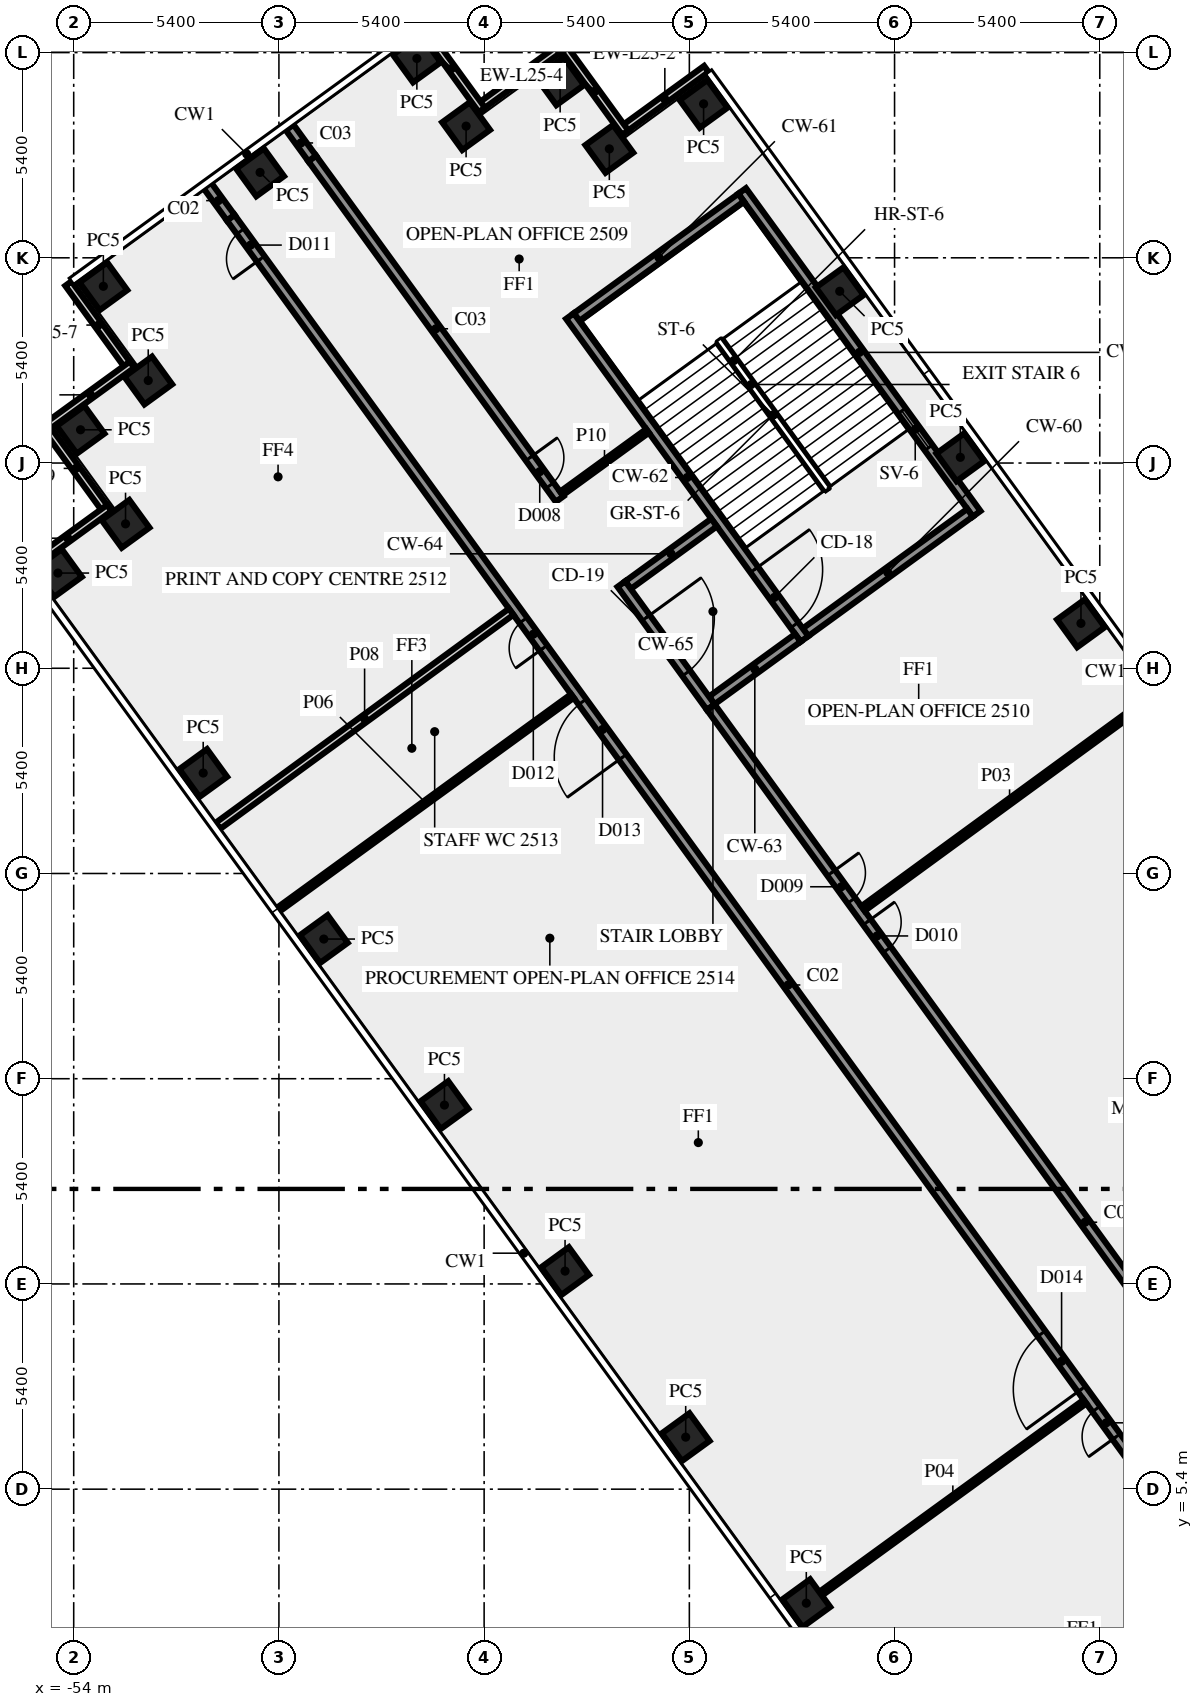
"""IFC4 building model, lengths in metres.
Left out: names, types, materials, properties, quantities, classifications, styles, units other than length and angle.
Written with IfcOpenShell. Run it as: python <this file> out.ifc"""

import sys

from ifc_helpers import new_model, si_unit, direction, frame, frame_2d, origin, origin_2d, place, context, subcontext, project, spatial, rectangle, extrude, element, fill, save


model = new_model("IFC4")
c1 = context("Model", 3, precision=1e-05, world=origin(), true_north=direction((0.0, 1.0)))
c2 = subcontext(c1, "Body", "Model", "MODEL_VIEW")
j1 = project(units=[si_unit("LENGTHUNIT", "METRE"), si_unit("PLANEANGLEUNIT", "RADIAN")], contexts=[c1])
p1 = place(None, origin())
s1 = spatial("IfcSite", under=j1, at=p1, CompositionType="ELEMENT")
p2 = place(p1, origin())
s2 = spatial("IfcBuilding", under=s1, at=p2, CompositionType="ELEMENT")
p3 = place(p2, frame((0.0, 0.0, 109.0)))
s3 = spatial("IfcBuildingStorey", under=s2, at=p3, CompositionType="ELEMENT", Elevation=109.0)
for number, where, z_axis, x_axis in (
    (1, (-27.495, 28.181, 0.0), (0.0, 0.0, 1.0), (-0.588, 0.809, 0.0)),
    (2, (-30.669, 32.55, 0.0), (0.0, 0.0, 1.0), (-0.588, 0.809, 0.0)),
    (3, (-33.843, 36.919, 0.0), (0.0, 0.0, 1.0), (-0.588, 0.809, 0.0)),
    (4, (-37.425, 41.85, 0.0), (0.0, 0.0, 1.0), (-0.588, 0.809, 0.0)),
    (5, (-39.906, 40.666, 0.0), (0.0, 0.0, 1.0), (-0.588, 0.809, 0.0)),
    (6, (-41.2, 42.445, 0.0), (0.0, 0.0, 1.0), (-0.588, 0.809, 0.0)),
    (7, (-43.675, 41.265, 0.0), (0.0, 0.0, 1.0), (-0.809, -0.588, 0.0)),
    (8, (-44.97, 43.045, 0.0), (0.0, 0.0, 1.0), (-0.809, -0.588, 0.0)),
    (9, (-49.096, 40.047, 0.0), (0.0, 0.0, 1.0), (-0.809, -0.588, 0.0)),
    (10, (-53.22, 37.05, 0.0), (0.0, 0.0, 1.0), (0.588, -0.809, 0.0)),
    (11, (-52.039, 34.571, 0.0), (0.0, 0.0, 1.0), (-0.809, -0.588, 0.0)),
    (12, (-53.82, 33.275, 0.0), (0.0, 0.0, 1.0), (0.588, -0.809, 0.0)),
    (13, (-52.636, 30.8, 0.0), (0.0, 0.0, 1.0), (-0.809, -0.588, 0.0)),
    (14, (-54.415, 29.505, 0.0), (0.0, 0.0, 1.0), (0.588, -0.809, 0.0)),
    (15, (-50.592, 24.243, 0.0), (0.0, 0.0, 1.0), (0.588, -0.809, 0.0)),
    (16, (-47.418, 19.875, 0.0), (0.0, 0.0, 1.0), (0.588, -0.809, 0.0)),
    (17, (-44.244, 15.506, 0.0), (0.0, 0.0, 1.0), (0.588, -0.809, 0.0)),
    (18, (-41.07, 11.137, 0.0), (0.0, 0.0, 1.0), (0.588, -0.809, 0.0)),
    (19, (-37.896, 6.769, 0.0), (0.0, 0.0, 1.0), (0.588, -0.809, 0.0)),
    (20, (-34.722, 2.4, 0.0), (0.0, 0.0, 1.0), (0.588, -0.809, 0.0)),
):
    element("IfcColumn", number, at=place(p3, frame(where, z_axis=z_axis, x_axis=x_axis)), inside=s3, PredefinedType="COLUMN", context=c2, shape_type="SweptSolid", body=[
        extrude(rectangle(XDim=0.9, YDim=0.9, at=origin_2d()), origin(), (0.0, 0.0, 1.0), 3.65),
    ])
p4 = place(p3, frame((-37.353, 42.768, 0.0), z_axis=(0.0, 0.0, 1.0), x_axis=(-0.809033161865, -0.587762999008, 0.0)))
e21 = element("IfcWall", 21, at=p4, inside=s3, PredefinedType="SOLIDWALL", context=c2, shape_type="SweptSolid", body=[
    extrude(rectangle(XDim=2.7, YDim=0.2, at=frame_2d((1.35, 0.0))), origin(), (0.0, 0.0, 1.0), 3.65),
])
p5 = place(p3, frame((-39.488, 41.094, 0.0), z_axis=(0.0, 0.0, 1.0), x_axis=(-0.587806000234, 0.809001919707, 0.0)))
e22 = element("IfcWall", 22, at=p5, inside=s3, PredefinedType="SOLIDWALL", context=c2, shape_type="SweptSolid", body=[
    extrude(rectangle(XDim=2.7, YDim=0.2, at=frame_2d((1.35, 0.0))), origin(), (0.0, 0.0, 1.0), 3.65),
])
for number, where, z_axis, x_axis in (
    (23, (-41.124, 43.366, 0.0), (0.0, 0.0, 1.0), (-0.809, -0.588, 0.0)),
    (24, (-43.259, 41.691, 0.0), (0.0, 0.0, 1.0), (-0.588, 0.809, 0.0)),
    (25, (-54.14, 37.123, 0.0), (0.0, 0.0, 1.0), (0.588, -0.809, 0.0)),
    (26, (-52.465, 34.987, 0.0), (0.0, 0.0, 1.0), (-0.809, -0.588, 0.0)),
):
    element("IfcWall", number, at=place(p3, frame(where, z_axis=z_axis, x_axis=x_axis)), inside=s3, PredefinedType="SOLIDWALL", context=c2, shape_type="SweptSolid", body=[
        extrude(rectangle(XDim=2.7, YDim=0.2, at=frame_2d((1.35, 0.0))), origin(), (0.0, 0.0, 1.0), 3.65),
    ])
p6 = place(p3, frame((-54.738, 33.351, 0.0), z_axis=(0.0, 0.0, 1.0), x_axis=(0.587779184282, -0.809021403008, 0.0)))
e27 = element("IfcWall", 27, at=p6, inside=s3, PredefinedType="SOLIDWALL", context=c2, shape_type="SweptSolid", body=[
    extrude(rectangle(XDim=2.7, YDim=0.2, at=frame_2d((1.35, 0.0))), origin(), (0.0, 0.0, 1.0), 3.65),
])
p7 = place(p3, frame((-53.063, 31.216, 0.0), z_axis=(0.0, 0.0, 1.0), x_axis=(-0.809033161865, -0.587762999008, 0.0)))
e28 = element("IfcWall", 28, at=p7, inside=s3, PredefinedType="SOLIDWALL", context=c2, shape_type="SweptSolid", body=[
    extrude(rectangle(XDim=2.7, YDim=0.2, at=frame_2d((1.35, 0.0))), origin(), (0.0, 0.0, 1.0), 3.65),
])
p8 = place(p3, frame((-30.24, 31.064, 0.0), z_axis=(0.0, 0.0, 1.0), x_axis=(-0.587795589702, 0.809009483706, 0.0)))
e29 = element("IfcWall", 29, at=p8, inside=s3, PredefinedType="SHEAR", context=c2, shape_type="SweptSolid", body=[
    extrude(rectangle(XDim=10.5, YDim=0.25, at=frame_2d((5.25, 0.0))), origin(), (0.0, 0.0, 1.0), 3.65),
])
p9 = place(p8, frame((2.15, 0.0, 1.0)))
e30 = element("IfcOpeningElement", 30, at=p9, cuts=e29, PredefinedType="OPENING", context=c2, shape_type="SweptSolid", body=[
    extrude(rectangle(XDim=1.2, YDim=1.2, at=frame_2d((0.6, 0.6))), frame((0.0, 0.135, 0.0), z_axis=(0.0, -1.0, 0.0), x_axis=(1.0, 0.0, 0.0)), (0.0, 0.0, 1.0), 0.27),
])
p10 = place(p3, frame((-30.414, 31.092, 0.0), z_axis=(0.0, 0.0, 1.0), x_axis=(-0.8089984606, -0.587810760999, 0.0)))
e31 = element("IfcWall", 31, at=p10, inside=s3, PredefinedType="SHEAR", context=c2, shape_type="SweptSolid", body=[
    extrude(rectangle(XDim=5.35, YDim=0.25, at=frame_2d((2.675, 0.0))), origin(), (0.0, 0.0, 1.0), 3.65),
])
p11 = place(p3, frame((-36.439, 39.384, 0.0), z_axis=(0.0, 0.0, 1.0), x_axis=(-0.809020161303, -0.587780893365, 0.0)))
e32 = element("IfcWall", 32, at=p11, inside=s3, PredefinedType="SHEAR", context=c2, shape_type="SweptSolid", body=[
    extrude(rectangle(XDim=5.35, YDim=0.25, at=frame_2d((2.675, 0.0))), origin(), (0.0, 0.0, 1.0), 3.65),
])
p12 = place(p3, frame((-40.942, 36.267, 0.0), z_axis=(0.0, 0.0, 1.0), x_axis=(0.587795589702, -0.809009483706, 0.0)))
e33 = element("IfcWall", 33, at=p12, inside=s3, PredefinedType="SHEAR", context=c2, shape_type="SweptSolid", body=[
    extrude(rectangle(XDim=10.5, YDim=0.25, at=frame_2d((5.25, 0.0))), origin(), (0.0, 0.0, 1.0), 3.65),
])
p13 = place(p12, frame((8.25, 0.0, 0.0)))
e34 = element("IfcOpeningElement", 34, at=p13, cuts=e33, PredefinedType="OPENING", context=c2, shape_type="SweptSolid", body=[
    extrude(rectangle(XDim=1.8, YDim=2.1, at=frame_2d((0.9, 1.05))), frame((0.0, 0.135, 0.0), z_axis=(0.0, -1.0, 0.0), x_axis=(1.0, 0.0, 0.0)), (0.0, 0.0, 1.0), 0.27),
])
for number, where, z_axis, x_axis in (
    (35, (-34.945, 27.8, 0.0), (0.0, 0.0, 1.0), (-0.809, -0.588, 0.0)),
    (36, (-37.149, 30.834, 0.0), (0.0, 0.0, 1.0), (-0.809, -0.588, 0.0)),
):
    element("IfcWall", number, at=place(p3, frame(where, z_axis=z_axis, x_axis=x_axis)), inside=s3, PredefinedType="SHEAR", context=c2, shape_type="SweptSolid", body=[
        extrude(rectangle(XDim=2.8, YDim=0.25, at=frame_2d((1.4, 0.0))), origin(), (0.0, 0.0, 1.0), 3.65),
    ])
p14 = place(p3, frame((-39.589, 29.216, 0.0), z_axis=(0.0, 0.0, 1.0), x_axis=(0.587772420479, -0.809026317077, 0.0)))
e37 = element("IfcWall", 37, at=p14, inside=s3, PredefinedType="SHEAR", context=c2, shape_type="SweptSolid", body=[
    extrude(rectangle(XDim=4.0, YDim=0.25, at=frame_2d((2.0, 0.0))), origin(), (0.0, 0.0, 1.0), 3.65),
])
p15 = place(p14, frame((1.1, 0.0, 0.0)))
e38 = element("IfcOpeningElement", 38, at=p15, cuts=e37, PredefinedType="OPENING", context=c2, shape_type="SweptSolid", body=[
    extrude(rectangle(XDim=1.8, YDim=2.1, at=frame_2d((0.9, 1.05))), frame((0.0, 0.135, 0.0), z_axis=(0.0, -1.0, 0.0), x_axis=(1.0, 0.0, 0.0)), (0.0, 0.0, 1.0), 0.27),
])
p16 = place(p3, frame((-20.531, -1.523, 0.0), z_axis=(0.0, 0.0, 1.0), x_axis=(-0.587784522481, 0.809017524614, 0.0)))
e39 = element("IfcWall", 39, at=p16, inside=s3, PredefinedType="SOLIDWALL", context=c2, shape_type="SweptSolid", body=[
    extrude(rectangle(XDim=49.912, YDim=0.25, at=frame_2d((24.956, 0.0))), origin(), (0.0, 0.0, 1.0), 3.65),
])
p17 = place(p16, frame((10.266, 0.0, 0.0)))
e40 = element("IfcOpeningElement", 40, at=p17, cuts=e39, PredefinedType="OPENING", context=c2, shape_type="SweptSolid", body=[
    extrude(rectangle(XDim=0.9, YDim=2.1, at=frame_2d((0.45, 1.05))), frame((0.0, 0.135, 0.0), z_axis=(0.0, -1.0, 0.0), x_axis=(1.0, 0.0, 0.0)), (0.0, 0.0, 1.0), 0.27),
])
p18 = place(p16, frame((32.366, 0.0, 0.0)))
e41 = element("IfcOpeningElement", 41, at=p18, cuts=e39, PredefinedType="OPENING", context=c2, shape_type="SweptSolid", body=[
    extrude(rectangle(XDim=1.8, YDim=2.1, at=frame_2d((0.9, 1.05))), frame((0.0, 0.135, 0.0), z_axis=(0.0, -1.0, 0.0), x_axis=(1.0, 0.0, 0.0)), (0.0, 0.0, 1.0), 0.27),
])
p19 = place(p16, frame((11.815, 0.0, 0.0)))
e42 = element("IfcOpeningElement", 42, at=p19, cuts=e39, PredefinedType="OPENING", context=c2, shape_type="SweptSolid", body=[
    extrude(rectangle(XDim=1.8, YDim=2.1, at=frame_2d((0.9, 1.05))), frame((0.0, 0.135, 0.0), z_axis=(0.0, -1.0, 0.0), x_axis=(1.0, 0.0, 0.0)), (0.0, 0.0, 1.0), 0.27),
])
p20 = place(p16, frame((48.57, 0.0, 0.0)))
e43 = element("IfcOpeningElement", 43, at=p20, cuts=e39, PredefinedType="OPENING", context=c2, shape_type="SweptSolid", body=[
    extrude(rectangle(XDim=0.9, YDim=2.1, at=frame_2d((0.45, 1.05))), frame((0.0, 0.135, 0.0), z_axis=(0.0, -1.0, 0.0), x_axis=(1.0, 0.0, 0.0)), (0.0, 0.0, 1.0), 0.27),
])
p21 = place(p16, frame((35.915, 0.0, 0.0)))
e44 = element("IfcOpeningElement", 44, at=p21, cuts=e39, PredefinedType="OPENING", context=c2, shape_type="SweptSolid", body=[
    extrude(rectangle(XDim=0.9, YDim=2.1, at=frame_2d((0.45, 1.05))), frame((0.0, 0.135, 0.0), z_axis=(0.0, -1.0, 0.0), x_axis=(1.0, 0.0, 0.0)), (0.0, 0.0, 1.0), 0.27),
])
p22 = place(p3, frame((-47.725, 40.414, 0.0), z_axis=(0.0, 0.0, 1.0), x_axis=(0.587773291021, -0.809025684612, 0.0)))
e45 = element("IfcWall", 45, at=p22, inside=s3, PredefinedType="SOLIDWALL", context=c2, shape_type="SweptSolid", body=[
    extrude(rectangle(XDim=11.079, YDim=0.25, at=frame_2d((5.539, 0.0))), origin(), (0.0, 0.0, 1.0), 3.65),
])
p23 = place(p22, frame((9.737, 0.0, 0.0)))
e46 = element("IfcOpeningElement", 46, at=p23, cuts=e45, PredefinedType="OPENING", context=c2, shape_type="SweptSolid", body=[
    extrude(rectangle(XDim=0.9, YDim=2.1, at=frame_2d((0.45, 1.05))), frame((0.0, 0.135, 0.0), z_axis=(0.0, -1.0, 0.0), x_axis=(1.0, 0.0, 0.0)), (0.0, 0.0, 1.0), 0.27),
])
p24 = place(p3, frame((-37.232, 25.972, 0.0), z_axis=(0.0, 0.0, 1.0), x_axis=(0.587786323093, -0.809016216391, 0.0)))
e47 = element("IfcWall", 47, at=p24, inside=s3, PredefinedType="SOLIDWALL", context=c2, shape_type="SweptSolid", body=[
    extrude(rectangle(XDim=33.493, YDim=0.25, at=frame_2d((16.747, 0.0))), origin(), (0.0, 0.0, 1.0), 3.65),
])
p25 = place(p24, frame((5.385, 0.0, 0.0)))
e48 = element("IfcOpeningElement", 48, at=p25, cuts=e47, PredefinedType="OPENING", context=c2, shape_type="SweptSolid", body=[
    extrude(rectangle(XDim=0.9, YDim=2.1, at=frame_2d((0.45, 1.05))), frame((0.0, 0.135, 0.0), z_axis=(0.0, -1.0, 0.0), x_axis=(1.0, 0.0, 0.0)), (0.0, 0.0, 1.0), 0.27),
])
p26 = place(p24, frame((6.985, 0.0, 0.0)))
e49 = element("IfcOpeningElement", 49, at=p26, cuts=e47, PredefinedType="OPENING", context=c2, shape_type="SweptSolid", body=[
    extrude(rectangle(XDim=0.9, YDim=2.1, at=frame_2d((0.45, 1.05))), frame((0.0, 0.135, 0.0), z_axis=(0.0, -1.0, 0.0), x_axis=(1.0, 0.0, 0.0)), (0.0, 0.0, 1.0), 0.27),
])
p27 = place(p3, frame((-33.23, 20.677, 0.0), z_axis=(0.0, 0.0, 1.0), x_axis=(0.807610282865, 0.589716568371, 0.0)))
e50 = element("IfcWall", 50, at=p27, inside=s3, PredefinedType="PARTITIONING", context=c2, shape_type="SweptSolid", body=[
    extrude(rectangle(XDim=9.55, YDim=0.15, at=frame_2d((4.775, 0.0))), origin(), (0.0, 0.0, 1.0), 2.75),
])
p28 = place(p3, frame((-27.389, 7.703, 0.0), z_axis=(0.0, 0.0, 1.0), x_axis=(-0.809052894195, -0.587735837256, 0.0)))
e51 = element("IfcWall", 51, at=p28, inside=s3, PredefinedType="PARTITIONING", context=c2, shape_type="SweptSolid", body=[
    extrude(rectangle(XDim=8.594, YDim=0.12, at=frame_2d((4.297, 0.0))), origin(), (0.0, 0.0, 1.0), 3.65),
])
p29 = place(p3, frame((-40.878, 26.27, 0.0), z_axis=(0.0, 0.0, 1.0), x_axis=(-0.809102944047, -0.587666934526, 0.0)))
e52 = element("IfcWall", 52, at=p29, inside=s3, PredefinedType="PARTITIONING", context=c2, shape_type="SweptSolid", body=[
    extrude(rectangle(XDim=9.55, YDim=0.12, at=frame_2d((4.775, 0.0))), origin(), (0.0, 0.0, 1.0), 2.75),
])
p30 = place(p3, frame((-50.202, 22.855, 0.0), z_axis=(0.0, 0.0, 1.0), x_axis=(0.807642555839, 0.589672368352, 0.0)))
e53 = element("IfcWall", 53, at=p30, inside=s3, PredefinedType="SOLIDWALL", context=c2, shape_type="SweptSolid", body=[
    extrude(rectangle(XDim=9.551, YDim=0.2, at=frame_2d((4.775, 0.0))), origin(), (0.0, 0.0, 1.0), 2.75),
])
p31 = place(p3, frame((-41.166, 31.599, 0.0), z_axis=(0.0, 0.0, 1.0), x_axis=(0.809090262332, 0.587684394381, 0.0)))
e54 = element("IfcWall", 54, at=p31, inside=s3, PredefinedType="PARTITIONING", context=c2, shape_type="SweptSolid", body=[
    extrude(rectangle(XDim=2.801, YDim=0.12, at=frame_2d((1.4, 0.0))), origin(), (0.0, 0.0, 1.0), 3.65),
])
p32 = place(p3, frame((-49.869, 38.856, 0.0), z_axis=(0.0, 0.0, 1.0), x_axis=(-0.587674273289, 0.809097613712, 0.0)))
e55 = element("IfcWall", 55, at=p32, inside=s3, PredefinedType="SOLIDWALL", context=c2, shape_type="SweptSolid", body=[
    extrude(rectangle(XDim=1.109, YDim=0.25, at=frame_2d((0.555, 0.0))), origin(), (0.0, 0.0, 1.0), 2.75),
])
p33 = place(p3, frame((-47.725, 40.414, 0.0), z_axis=(0.0, 0.0, 1.0), x_axis=(-0.587840411638, 0.808976915892, 0.0)))
e56 = element("IfcWall", 56, at=p33, inside=s3, PredefinedType="SOLIDWALL", context=c2, shape_type="SweptSolid", body=[
    extrude(rectangle(XDim=1.008, YDim=0.25, at=frame_2d((0.504, 0.0))), origin(), (0.0, 0.0, 1.0), 2.75),
])
p34 = place(p9, origin())
e57 = element("IfcWindow", 57, at=p34, inside=s3, PartitioningType="SINGLE_PANEL", PredefinedType="WINDOW", context=c2, shape_type="SweptSolid", body=[
    extrude(rectangle(XDim=1.2, YDim=1.2, at=frame_2d((0.6, 0.6))), frame((0.0, 0.03, 0.0), z_axis=(0.0, -1.0, 0.0), x_axis=(1.0, 0.0, 0.0)), (0.0, 0.0, 1.0), 0.06),
])
fill(e30, e57)
p35 = place(p13, origin())
e58 = element("IfcDoor", 58, at=p35, inside=s3, OperationType="DOUBLE_DOOR_SINGLE_SWING", PredefinedType="DOOR", context=c2, shape_type="SweptSolid", body=[
    extrude(rectangle(XDim=1.8, YDim=2.1, at=frame_2d((0.9, 1.05))), frame((0.0, 0.025, 0.0), z_axis=(0.0, -1.0, 0.0), x_axis=(1.0, 0.0, 0.0)), (0.0, 0.0, 1.0), 0.05),
])
fill(e34, e58)
p36 = place(p15, origin())
e59 = element("IfcDoor", 59, at=p36, inside=s3, OperationType="DOUBLE_DOOR_SINGLE_SWING", PredefinedType="DOOR", context=c2, shape_type="SweptSolid", body=[
    extrude(rectangle(XDim=1.8, YDim=2.1, at=frame_2d((0.9, 1.05))), frame((0.0, 0.025, 0.0), z_axis=(0.0, -1.0, 0.0), x_axis=(1.0, 0.0, 0.0)), (0.0, 0.0, 1.0), 0.05),
])
fill(e38, e59)
p37 = place(p23, origin())
e60 = element("IfcDoor", 60, at=p37, inside=s3, OperationType="SINGLE_SWING_RIGHT", PredefinedType="DOOR", context=c2, shape_type="SweptSolid", body=[
    extrude(rectangle(XDim=0.9, YDim=2.1, at=frame_2d((0.45, 1.05))), frame((0.0, 0.025, 0.0), z_axis=(0.0, -1.0, 0.0), x_axis=(1.0, 0.0, 0.0)), (0.0, 0.0, 1.0), 0.05),
])
fill(e46, e60)
p38 = place(p25, origin())
e61 = element("IfcDoor", 61, at=p38, inside=s3, OperationType="SINGLE_SWING_RIGHT", PredefinedType="DOOR", context=c2, shape_type="SweptSolid", body=[
    extrude(rectangle(XDim=0.9, YDim=2.1, at=frame_2d((0.45, 1.05))), frame((0.0, 0.025, 0.0), z_axis=(0.0, -1.0, 0.0), x_axis=(1.0, 0.0, 0.0)), (0.0, 0.0, 1.0), 0.05),
])
fill(e48, e61)
p39 = place(p17, origin())
e62 = element("IfcDoor", 62, at=p39, inside=s3, OperationType="SINGLE_SWING_RIGHT", PredefinedType="DOOR", context=c2, shape_type="SweptSolid", body=[
    extrude(rectangle(XDim=0.9, YDim=2.1, at=frame_2d((0.45, 1.05))), frame((0.0, 0.025, 0.0), z_axis=(0.0, -1.0, 0.0), x_axis=(1.0, 0.0, 0.0)), (0.0, 0.0, 1.0), 0.05),
])
fill(e40, e62)
p40 = place(p26, origin())
e63 = element("IfcDoor", 63, at=p40, inside=s3, OperationType="SINGLE_SWING_LEFT", PredefinedType="DOOR", context=c2, shape_type="SweptSolid", body=[
    extrude(rectangle(XDim=0.9, YDim=2.1, at=frame_2d((0.45, 1.05))), frame((0.0, 0.025, 0.0), z_axis=(0.0, -1.0, 0.0), x_axis=(1.0, 0.0, 0.0)), (0.0, 0.0, 1.0), 0.05),
])
fill(e49, e63)
p41 = place(p18, origin())
e64 = element("IfcDoor", 64, at=p41, inside=s3, OperationType="DOUBLE_DOOR_SINGLE_SWING", PredefinedType="DOOR", context=c2, shape_type="SweptSolid", body=[
    extrude(rectangle(XDim=1.8, YDim=2.1, at=frame_2d((0.9, 1.05))), frame((0.0, 0.025, 0.0), z_axis=(0.0, -1.0, 0.0), x_axis=(1.0, 0.0, 0.0)), (0.0, 0.0, 1.0), 0.05),
])
fill(e41, e64)
p42 = place(p19, origin())
e65 = element("IfcDoor", 65, at=p42, inside=s3, OperationType="DOUBLE_DOOR_SINGLE_SWING", PredefinedType="DOOR", context=c2, shape_type="SweptSolid", body=[
    extrude(rectangle(XDim=1.8, YDim=2.1, at=frame_2d((0.9, 1.05))), frame((0.0, 0.025, 0.0), z_axis=(0.0, -1.0, 0.0), x_axis=(1.0, 0.0, 0.0)), (0.0, 0.0, 1.0), 0.05),
])
fill(e42, e65)
p43 = place(p20, origin())
e66 = element("IfcDoor", 66, at=p43, inside=s3, OperationType="SINGLE_SWING_RIGHT", PredefinedType="DOOR", context=c2, shape_type="SweptSolid", body=[
    extrude(rectangle(XDim=0.9, YDim=2.1, at=frame_2d((0.45, 1.05))), frame((0.0, 0.025, 0.0), z_axis=(0.0, -1.0, 0.0), x_axis=(1.0, 0.0, 0.0)), (0.0, 0.0, 1.0), 0.05),
])
fill(e43, e66)
p44 = place(p21, origin())
e67 = element("IfcDoor", 67, at=p44, inside=s3, OperationType="SINGLE_SWING_RIGHT", PredefinedType="DOOR", context=c2, shape_type="SweptSolid", body=[
    extrude(rectangle(XDim=0.9, YDim=2.1, at=frame_2d((0.45, 1.05))), frame((0.0, 0.025, 0.0), z_axis=(0.0, -1.0, 0.0), x_axis=(1.0, 0.0, 0.0)), (0.0, 0.0, 1.0), 0.05),
])
fill(e44, e67)
save(model, sys.argv[1])
